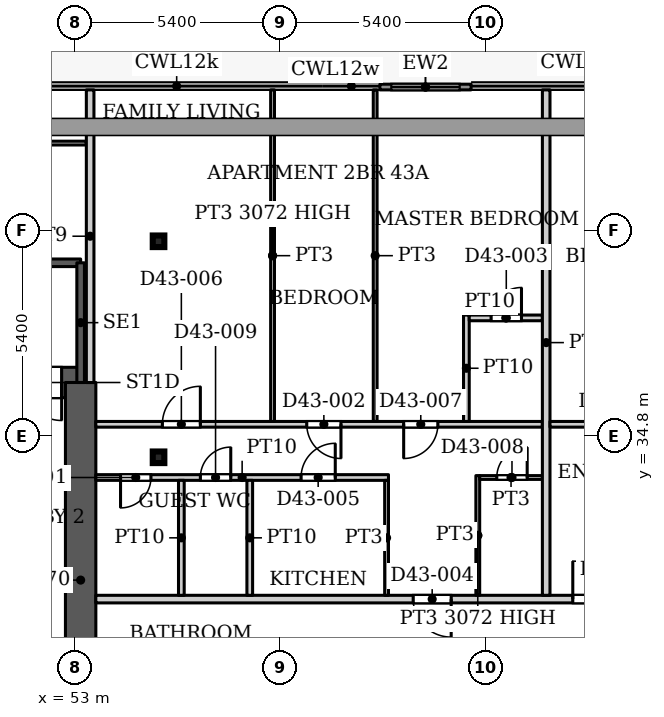
"""IFC4 building model, lengths in metres.
Left out: names, types, materials, properties, quantities, classifications, styles, units other than length and angle.
Written with IfcOpenShell. Run it as: python <this file> out.ifc"""

import sys

from ifc_helpers import new_model, si_unit, direction, frame, frame_2d, origin, origin_2d, place, context, subcontext, project, spatial, rectangle, hollow_rectangle, extrude, source, transform, mapped, element, fill, save


model = new_model("IFC4")
c1 = context("Model", 3, precision=1e-05, world=origin(), true_north=direction((0.0, 1.0)))
c2 = subcontext(c1, "Body", "Model", "MODEL_VIEW")
j1 = project(units=[si_unit("LENGTHUNIT", "METRE"), si_unit("PLANEANGLEUNIT", "RADIAN")], contexts=[c1])
p1 = place(None, origin())
s1 = spatial("IfcSite", under=j1, at=p1, CompositionType="ELEMENT")
p2 = place(p1, origin())
s2 = spatial("IfcBuilding", under=s1, at=p2, CompositionType="ELEMENT")
p3 = place(p2, frame((0.0, 0.0, 183.8)))
s3 = spatial("IfcBuildingStorey", under=s2, at=p3, CompositionType="ELEMENT", Elevation=183.8)
for number, where, z_axis, x_axis in (
    (1, (55.2, 34.232, 0.0), (0.0, 0.0, 1.0), (1.0, 0.0, 0.0)),
    (2, (55.2, 39.916, 0.0), (0.0, 0.0, 1.0), (1.0, 0.0, 0.0)),
):
    element("IfcColumn", number, at=place(p3, frame(where, z_axis=z_axis, x_axis=x_axis)), inside=s3, PredefinedType="COLUMN", context=c2, shape_type="SweptSolid", body=[
        extrude(hollow_rectangle(XDim=0.305, YDim=0.305, WallThickness=0.016, InnerFilletRadius=0.016, OuterFilletRadius=0.032, at=origin_2d()), origin(), (0.0, 0.0, 1.0), 3.9),
    ])
p4 = place(p3, frame((34.75, 36.2, 0.0), z_axis=(0.0, 0.0, 1.0), x_axis=(1.0, 0.0, 0.0)))
e3 = element("IfcWall", 3, at=p4, inside=s3, PredefinedType="SHEAR", context=c2, shape_type="SweptSolid", body=[
    extrude(rectangle(XDim=18.4, YDim=0.8, at=frame_2d((9.2, 0.0))), origin(), (0.0, 0.0, 1.0), 3.9),
])
p5 = place(p4, frame((16.9, 0.0, 0.0)))
e4 = element("IfcOpeningElement", 4, at=p5, cuts=e3, PredefinedType="OPENING", context=c2, shape_type="SweptSolid", body=[
    extrude(rectangle(XDim=1.0, YDim=2.2, at=frame_2d((0.5, 1.1))), frame((0.0, 0.41, 0.0), z_axis=(0.0, -1.0, 0.0), x_axis=(1.0, 0.0, 0.0)), (0.0, 0.0, 1.0), 0.82),
])
p6 = place(p3, frame((53.15, 25.8, 0.0), z_axis=(0.0, 0.0, 1.0), x_axis=(0.0, 1.0, 0.0)))
e5 = element("IfcWall", 5, at=p6, inside=s3, PredefinedType="SHEAR", context=c2, shape_type="SweptSolid", body=[
    extrude(rectangle(XDim=10.4, YDim=0.8, at=frame_2d((5.2, 0.0))), origin(), (0.0, 0.0, 1.0), 3.9),
])
p7 = place(p3, frame((61.024, 43.975, 0.0), z_axis=(0.0, 0.0, 1.0), x_axis=(1.0, 0.0, 0.0)))
e6 = element("IfcWall", 6, at=p7, inside=s3, PredefinedType="SOLIDWALL", context=c2, shape_type="SweptSolid", body=[
    extrude(rectangle(XDim=2.4, YDim=0.15, at=frame_2d((1.2, 0.0))), origin(), (0.0, 0.0, 1.0), 3.75),
])
p8 = place(p7, frame((0.3, 0.0, 0.0)))
e7 = element("IfcOpeningElement", 7, at=p8, cuts=e6, PredefinedType="OPENING", context=c2, shape_type="SweptSolid", body=[
    extrude(rectangle(XDim=1.8, YDim=2.4, at=frame_2d((0.9, 1.2))), frame((0.0, 0.085, 0.0), z_axis=(0.0, -1.0, 0.0), x_axis=(1.0, 0.0, 0.0)), (0.0, 0.0, 1.0), 0.17),
])
p9 = place(p3, frame((43.99, 39.35, 0.0), z_axis=(0.0, 0.0, 1.0), x_axis=(1.0, 0.0, 0.0)))
e8 = element("IfcWall", 8, at=p9, inside=s3, PredefinedType="SHEAR", context=c2, shape_type="SweptSolid", body=[
    extrude(rectangle(XDim=9.16, YDim=0.2, at=frame_2d((4.58, 0.0))), origin(), (0.0, 0.0, 1.0), 3.9),
])
p10 = place(p3, frame((53.15, 36.2, 0.0), z_axis=(0.0, 0.0, 1.0), x_axis=(0.0, 1.0, 0.0)))
e9 = element("IfcWall", 9, at=p10, inside=s3, PredefinedType="SHEAR", context=c2, shape_type="SweptSolid", body=[
    extrude(rectangle(XDim=3.15, YDim=0.2, at=frame_2d((1.575, 0.0))), origin(), (0.0, 0.0, 1.0), 3.9),
])
p11 = place(p3, frame((38.399, 42.5, 0.0), z_axis=(0.0, 0.0, 1.0), x_axis=(1.0, 0.0, 0.0)))
e10 = element("IfcWall", 10, at=p11, inside=s3, PredefinedType="PARTITIONING", context=c2, shape_type="SweptSolid", body=[
    extrude(rectangle(XDim=14.901, YDim=0.1, at=frame_2d((7.451, 0.0))), origin(), (0.0, 0.0, 1.0), 3.6),
])
p12 = place(p11, frame((6.801, 0.0, 0.0)))
e11 = element("IfcOpeningElement", 11, at=p12, cuts=e10, PredefinedType="OPENING", context=c2, shape_type="SweptSolid", body=[
    extrude(rectangle(XDim=1.0, YDim=2.1, at=frame_2d((0.5, 1.05))), frame((0.0, 0.06, 0.0), z_axis=(0.0, -1.0, 0.0), x_axis=(1.0, 0.0, 0.0)), (0.0, 0.0, 1.0), 0.12),
])
p13 = place(p3, frame((53.4, 36.199, 0.0), z_axis=(0.0, 0.0, 1.0), x_axis=(0.0, 1.0, 0.0)))
e12 = element("IfcWall", 12, at=p13, inside=s3, PredefinedType="PARTITIONING", context=c2, shape_type="SweptSolid", body=[
    extrude(rectangle(XDim=7.701, YDim=0.2, at=frame_2d((3.851, 0.0))), origin(), (0.0, 0.0, 1.0), 3.6),
])
p14 = place(p3, frame((53.549, 30.5, 0.0), z_axis=(0.0, 0.0, 1.0), x_axis=(1.0, 0.0, 0.0)))
e13 = element("IfcWall", 13, at=p14, inside=s3, PredefinedType="PARTITIONING", context=c2, shape_type="SweptSolid", body=[
    extrude(rectangle(XDim=44.551, YDim=0.2, at=frame_2d((22.275, 0.0))), origin(), (0.0, 0.0, 1.0), 3.6),
])
p15 = place(p14, frame((8.351, 0.0, 0.0)))
e14 = element("IfcOpeningElement", 14, at=p15, cuts=e13, PredefinedType="OPENING", context=c2, shape_type="SweptSolid", body=[
    extrude(rectangle(XDim=1.0, YDim=2.1, at=frame_2d((0.5, 1.05))), frame((0.0, 0.11, 0.0), z_axis=(0.0, -1.0, 0.0), x_axis=(1.0, 0.0, 0.0)), (0.0, 0.0, 1.0), 0.22),
])
p16 = place(p14, frame((12.551, 0.0, 0.0)))
e15 = element("IfcOpeningElement", 15, at=p16, cuts=e13, PredefinedType="OPENING", context=c2, shape_type="SweptSolid", body=[
    extrude(rectangle(XDim=1.0, YDim=2.1, at=frame_2d((0.5, 1.05))), frame((0.0, 0.11, 0.0), z_axis=(0.0, -1.0, 0.0), x_axis=(1.0, 0.0, 0.0)), (0.0, 0.0, 1.0), 0.22),
])
p17 = place(p14, frame((28.751, 0.0, 0.0)))
e16 = element("IfcOpeningElement", 16, at=p17, cuts=e13, PredefinedType="OPENING", context=c2, shape_type="SweptSolid", body=[
    extrude(rectangle(XDim=1.0, YDim=2.1, at=frame_2d((0.5, 1.05))), frame((0.0, 0.11, 0.0), z_axis=(0.0, -1.0, 0.0), x_axis=(1.0, 0.0, 0.0)), (0.0, 0.0, 1.0), 0.22),
])
p18 = place(p14, frame((40.751, 0.0, 0.0)))
e17 = element("IfcOpeningElement", 17, at=p18, cuts=e13, PredefinedType="OPENING", context=c2, shape_type="SweptSolid", body=[
    extrude(rectangle(XDim=1.0, YDim=2.1, at=frame_2d((0.5, 1.05))), frame((0.0, 0.11, 0.0), z_axis=(0.0, -1.0, 0.0), x_axis=(1.0, 0.0, 0.0)), (0.0, 0.0, 1.0), 0.22),
])
p19 = place(p3, frame((53.549, 33.7, 0.0), z_axis=(0.0, 0.0, 1.0), x_axis=(1.0, 0.0, 0.0)))
e18 = element("IfcWall", 18, at=p19, inside=s3, PredefinedType="PARTITIONING", context=c2, shape_type="SweptSolid", body=[
    extrude(rectangle(XDim=7.701, YDim=0.15, at=frame_2d((3.851, 0.0))), origin(), (0.0, 0.0, 1.0), 3.6),
])
p20 = place(p19, frame((0.651, 0.0, 0.0)))
e19 = element("IfcOpeningElement", 19, at=p20, cuts=e18, PredefinedType="OPENING", context=c2, shape_type="SweptSolid", body=[
    extrude(rectangle(XDim=0.8, YDim=2.1, at=frame_2d((0.4, 1.05))), frame((0.0, 0.085, 0.0), z_axis=(0.0, -1.0, 0.0), x_axis=(1.0, 0.0, 0.0)), (0.0, 0.0, 1.0), 0.17),
])
p21 = place(p19, frame((5.401, 0.0, 0.0)))
e20 = element("IfcOpeningElement", 20, at=p21, cuts=e18, PredefinedType="OPENING", context=c2, shape_type="SweptSolid", body=[
    extrude(rectangle(XDim=0.9, YDim=2.1, at=frame_2d((0.45, 1.05))), frame((0.0, 0.085, 0.0), z_axis=(0.0, -1.0, 0.0), x_axis=(1.0, 0.0, 0.0)), (0.0, 0.0, 1.0), 0.17),
])
p22 = place(p19, frame((2.751, 0.0, 0.0)))
e21 = element("IfcOpeningElement", 21, at=p22, cuts=e18, PredefinedType="OPENING", context=c2, shape_type="SweptSolid", body=[
    extrude(rectangle(XDim=0.8, YDim=2.1, at=frame_2d((0.4, 1.05))), frame((0.0, 0.085, 0.0), z_axis=(0.0, -1.0, 0.0), x_axis=(1.0, 0.0, 0.0)), (0.0, 0.0, 1.0), 0.17),
])
p23 = place(p3, frame((53.549, 35.1, 0.0), z_axis=(0.0, 0.0, 1.0), x_axis=(1.0, 0.0, 0.0)))
e22 = element("IfcWall", 22, at=p23, inside=s3, PredefinedType="PARTITIONING", context=c2, shape_type="SweptSolid", body=[
    extrude(rectangle(XDim=11.751, YDim=0.15, at=frame_2d((5.875, 0.0))), origin(), (0.0, 0.0, 1.0), 3.6),
])
p24 = place(p23, frame((5.551, 0.0, 0.0)))
e23 = element("IfcOpeningElement", 23, at=p24, cuts=e22, PredefinedType="OPENING", context=c2, shape_type="SweptSolid", body=[
    extrude(rectangle(XDim=0.9, YDim=2.1, at=frame_2d((0.45, 1.05))), frame((0.0, 0.085, 0.0), z_axis=(0.0, -1.0, 0.0), x_axis=(1.0, 0.0, 0.0)), (0.0, 0.0, 1.0), 0.17),
])
p25 = place(p23, frame((1.751, 0.0, 0.0)))
e24 = element("IfcOpeningElement", 24, at=p25, cuts=e22, PredefinedType="OPENING", context=c2, shape_type="SweptSolid", body=[
    extrude(rectangle(XDim=1.0, YDim=2.1, at=frame_2d((0.5, 1.05))), frame((0.0, 0.085, 0.0), z_axis=(0.0, -1.0, 0.0), x_axis=(1.0, 0.0, 0.0)), (0.0, 0.0, 1.0), 0.17),
])
p26 = place(p23, frame((8.101, 0.0, 0.0)))
e25 = element("IfcOpeningElement", 25, at=p26, cuts=e22, PredefinedType="OPENING", context=c2, shape_type="SweptSolid", body=[
    extrude(rectangle(XDim=0.9, YDim=2.1, at=frame_2d((0.45, 1.05))), frame((0.0, 0.085, 0.0), z_axis=(0.0, -1.0, 0.0), x_axis=(1.0, 0.0, 0.0)), (0.0, 0.0, 1.0), 0.17),
])
for number, where, z_axis, x_axis in (
    (26, (55.8, 30.6, 0.0), (0.0, 0.0, 1.0), (0.0, 1.0, 0.0)),
    (27, (57.6, 30.6, 0.0), (0.0, 0.0, 1.0), (0.0, 1.0, 0.0)),
):
    element("IfcWall", number, at=place(p3, frame(where, z_axis=z_axis, x_axis=x_axis)), inside=s3, PredefinedType="PARTITIONING", context=c2, shape_type="SweptSolid", body=[
        extrude(rectangle(XDim=3.025, YDim=0.15, at=frame_2d((1.512, 0.0))), origin(), (0.0, 0.0, 1.0), 3.6),
    ])
p27 = place(p3, frame((58.2, 35.175, 0.0), z_axis=(0.0, 0.0, 1.0), x_axis=(0.0, 1.0, 0.0)))
e28 = element("IfcWall", 28, at=p27, inside=s3, PredefinedType="PARTITIONING", context=c2, shape_type="SweptSolid", body=[
    extrude(rectangle(XDim=8.725, YDim=0.1, at=frame_2d((4.362, 0.0))), origin(), (0.0, 0.0, 1.0), 3.072),
])
p28 = place(p3, frame((60.9, 35.175, 0.0), z_axis=(0.0, 0.0, 1.0), x_axis=(0.0, 1.0, 0.0)))
e29 = element("IfcWall", 29, at=p28, inside=s3, PredefinedType="PARTITIONING", context=c2, shape_type="SweptSolid", body=[
    extrude(rectangle(XDim=8.725, YDim=0.1, at=frame_2d((4.362, 0.0))), origin(), (0.0, 0.0, 1.0), 3.6),
])
p29 = place(p3, frame((61.2, 30.6, 0.0), z_axis=(0.0, 0.0, 1.0), x_axis=(0.0, 1.0, 0.0)))
e30 = element("IfcWall", 30, at=p29, inside=s3, PredefinedType="PARTITIONING", context=c2, shape_type="SweptSolid", body=[
    extrude(rectangle(XDim=3.025, YDim=0.1, at=frame_2d((1.512, 0.0))), origin(), (0.0, 0.0, 1.0), 3.6),
])
p30 = place(p3, frame((63.3, 35.175, 0.0), z_axis=(0.0, 0.0, 1.0), x_axis=(0.0, 1.0, 0.0)))
e31 = element("IfcWall", 31, at=p30, inside=s3, PredefinedType="PARTITIONING", context=c2, shape_type="SweptSolid", body=[
    extrude(rectangle(XDim=2.8, YDim=0.15, at=frame_2d((1.4, 0.0))), origin(), (0.0, 0.0, 1.0), 3.6),
])
p31 = place(p3, frame((63.375, 37.9, 0.0), z_axis=(0.0, 0.0, 1.0), x_axis=(1.0, 0.0, 0.0)))
e32 = element("IfcWall", 32, at=p31, inside=s3, PredefinedType="PARTITIONING", context=c2, shape_type="SweptSolid", body=[
    extrude(rectangle(XDim=1.925, YDim=0.15, at=frame_2d((0.962, 0.0))), origin(), (0.0, 0.0, 1.0), 3.6),
])
p32 = place(p31, frame((0.575, 0.0, 0.0)))
e33 = element("IfcOpeningElement", 33, at=p32, cuts=e32, PredefinedType="OPENING", context=c2, shape_type="SweptSolid", body=[
    extrude(rectangle(XDim=0.8, YDim=2.1, at=frame_2d((0.4, 1.05))), frame((0.0, 0.085, 0.0), z_axis=(0.0, -1.0, 0.0), x_axis=(1.0, 0.0, 0.0)), (0.0, 0.0, 1.0), 0.17),
])
p33 = place(p3, frame((63.6, 30.6, 0.0), z_axis=(0.0, 0.0, 1.0), x_axis=(0.0, 1.0, 0.0)))
e34 = element("IfcWall", 34, at=p33, inside=s3, PredefinedType="PARTITIONING", context=c2, shape_type="SweptSolid", body=[
    extrude(rectangle(XDim=3.15, YDim=0.1, at=frame_2d((1.575, 0.0))), origin(), (0.0, 0.0, 1.0), 3.072),
])
p34 = place(p3, frame((63.65, 33.7, 0.0), z_axis=(0.0, 0.0, 1.0), x_axis=(1.0, 0.0, 0.0)))
e35 = element("IfcWall", 35, at=p34, inside=s3, PredefinedType="PARTITIONING", context=c2, shape_type="SweptSolid", body=[
    extrude(rectangle(XDim=1.65, YDim=0.1, at=frame_2d((0.825, 0.0))), origin(), (0.0, 0.0, 1.0), 3.6),
])
p35 = place(p34, frame((0.45, 0.0, 0.0)))
e36 = element("IfcOpeningElement", 36, at=p35, cuts=e35, PredefinedType="OPENING", context=c2, shape_type="SweptSolid", body=[
    extrude(rectangle(XDim=0.8, YDim=2.1, at=frame_2d((0.4, 1.05))), frame((0.0, 0.06, 0.0), z_axis=(0.0, -1.0, 0.0), x_axis=(1.0, 0.0, 0.0)), (0.0, 0.0, 1.0), 0.12),
])
p36 = place(p3, frame((65.4, 30.6, 0.0), z_axis=(0.0, 0.0, 1.0), x_axis=(0.0, 1.0, 0.0)))
e37 = element("IfcWall", 37, at=p36, inside=s3, PredefinedType="PARTITIONING", context=c2, shape_type="SweptSolid", body=[
    extrude(rectangle(XDim=13.3, YDim=0.2, at=frame_2d((6.65, 0.0))), origin(), (0.0, 0.0, 1.0), 3.6),
])
p37 = place(p3, frame((65.5, 35.1, 0.0), z_axis=(0.0, 0.0, 1.0), x_axis=(1.0, 0.0, 0.0)))
e38 = element("IfcWall", 38, at=p37, inside=s3, PredefinedType="PARTITIONING", context=c2, shape_type="SweptSolid", body=[
    extrude(rectangle(XDim=13.3, YDim=0.15, at=frame_2d((6.65, 0.0))), origin(), (0.0, 0.0, 1.0), 3.6),
])
p38 = place(p37, frame((1.4, 0.0, 0.0)))
e39 = element("IfcOpeningElement", 39, at=p38, cuts=e38, PredefinedType="OPENING", context=c2, shape_type="SweptSolid", body=[
    extrude(rectangle(XDim=0.9, YDim=2.1, at=frame_2d((0.45, 1.05))), frame((0.0, 0.085, 0.0), z_axis=(0.0, -1.0, 0.0), x_axis=(1.0, 0.0, 0.0)), (0.0, 0.0, 1.0), 0.17),
])
p39 = place(p37, frame((10.5, 0.0, 0.0)))
e40 = element("IfcOpeningElement", 40, at=p39, cuts=e38, PredefinedType="OPENING", context=c2, shape_type="SweptSolid", body=[
    extrude(rectangle(XDim=1.0, YDim=2.1, at=frame_2d((0.5, 1.05))), frame((0.0, 0.085, 0.0), z_axis=(0.0, -1.0, 0.0), x_axis=(1.0, 0.0, 0.0)), (0.0, 0.0, 1.0), 0.17),
])
p40 = place(p37, frame((6.8, 0.0, 0.0)))
e41 = element("IfcOpeningElement", 41, at=p40, cuts=e38, PredefinedType="OPENING", context=c2, shape_type="SweptSolid", body=[
    extrude(rectangle(XDim=0.9, YDim=2.1, at=frame_2d((0.45, 1.05))), frame((0.0, 0.085, 0.0), z_axis=(0.0, -1.0, 0.0), x_axis=(1.0, 0.0, 0.0)), (0.0, 0.0, 1.0), 0.17),
])
m1 = source(origin(), c2, "Body", "SweptSolid", [
    extrude(rectangle(XDim=1.8, YDim=2.4, at=frame_2d((0.9, 1.2))), frame((0.0, 0.025, 0.0), z_axis=(0.0, -1.0, 0.0), x_axis=(1.0, 0.0, 0.0)), (0.0, 0.0, 1.0), 0.05),
])
p41 = place(p8, origin())
e42 = element("IfcDoor", 42, at=p41, inside=s3, OperationType="SLIDING_TO_LEFT", PredefinedType="DOOR", context=c2, shape_type="MappedRepresentation", body=[
    mapped(m1, transform((0.0, 0.0, 0.0), x_axis=(1.0, 0.0, 0.0), y_axis=(0.0, 1.0, 0.0), z_axis=(0.0, 0.0, 1.0), scale=1.0)),
])
fill(e7, e42)
m2 = source(origin(), c2, "Body", "SweptSolid", [
    extrude(rectangle(XDim=1.0, YDim=2.2, at=frame_2d((0.5, 1.1))), frame((0.0, 0.025, 0.0), z_axis=(0.0, -1.0, 0.0), x_axis=(1.0, 0.0, 0.0)), (0.0, 0.0, 1.0), 0.05),
])
p42 = place(p5, origin())
e43 = element("IfcDoor", 43, at=p42, inside=s3, OperationType="SINGLE_SWING_RIGHT", PredefinedType="DOOR", context=c2, shape_type="MappedRepresentation", body=[
    mapped(m2, transform((0.0, 0.0, 0.0), x_axis=(1.0, 0.0, 0.0), y_axis=(0.0, 1.0, 0.0), z_axis=(0.0, 0.0, 1.0), scale=1.0)),
])
fill(e4, e43)
m3 = source(origin(), c2, "Body", "SweptSolid", [
    extrude(rectangle(XDim=0.8, YDim=2.1, at=frame_2d((0.4, 1.05))), frame((0.0, 0.025, 0.0), z_axis=(0.0, -1.0, 0.0), x_axis=(1.0, 0.0, 0.0)), (0.0, 0.0, 1.0), 0.05),
])
p43 = place(p20, origin())
e44 = element("IfcDoor", 44, at=p43, inside=s3, OperationType="SINGLE_SWING_RIGHT", PredefinedType="DOOR", context=c2, shape_type="MappedRepresentation", body=[
    mapped(m3, transform((0.0, 0.0, 0.0), x_axis=(1.0, 0.0, 0.0), y_axis=(0.0, 1.0, 0.0), z_axis=(0.0, 0.0, 1.0), scale=1.0)),
])
fill(e19, e44)
m4 = source(origin(), c2, "Body", "SweptSolid", [
    extrude(rectangle(XDim=0.9, YDim=2.1, at=frame_2d((0.45, 1.05))), frame((0.0, 0.025, 0.0), z_axis=(0.0, -1.0, 0.0), x_axis=(1.0, 0.0, 0.0)), (0.0, 0.0, 1.0), 0.05),
])
p44 = place(p24, origin())
e45 = element("IfcDoor", 45, at=p44, inside=s3, OperationType="SINGLE_SWING_RIGHT", PredefinedType="DOOR", context=c2, shape_type="MappedRepresentation", body=[
    mapped(m4, transform((0.0, 0.0, 0.0), x_axis=(1.0, 0.0, 0.0), y_axis=(0.0, 1.0, 0.0), z_axis=(0.0, 0.0, 1.0), scale=1.0)),
])
fill(e23, e45)
p45 = place(p32, origin())
e46 = element("IfcDoor", 46, at=p45, inside=s3, OperationType="SINGLE_SWING_LEFT", PredefinedType="DOOR", context=c2, shape_type="MappedRepresentation", body=[
    mapped(m3, transform((0.0, 0.0, 0.0), x_axis=(1.0, 0.0, 0.0), y_axis=(0.0, 1.0, 0.0), z_axis=(0.0, 0.0, 1.0), scale=1.0)),
])
fill(e33, e46)
m5 = source(origin(), c2, "Body", "SweptSolid", [
    extrude(rectangle(XDim=1.0, YDim=2.1, at=frame_2d((0.5, 1.05))), frame((0.0, 0.025, 0.0), z_axis=(0.0, -1.0, 0.0), x_axis=(1.0, 0.0, 0.0)), (0.0, 0.0, 1.0), 0.05),
])
p46 = place(p15, origin())
e47 = element("IfcDoor", 47, at=p46, inside=s3, OperationType="SINGLE_SWING_RIGHT", PredefinedType="DOOR", context=c2, shape_type="MappedRepresentation", body=[
    mapped(m5, transform((0.0, 0.0, 0.0), x_axis=(1.0, 0.0, 0.0), y_axis=(0.0, 1.0, 0.0), z_axis=(0.0, 0.0, 1.0), scale=1.0)),
])
fill(e14, e47)
p47 = place(p21, origin())
e48 = element("IfcDoor", 48, at=p47, inside=s3, OperationType="SINGLE_SWING_LEFT", PredefinedType="DOOR", context=c2, shape_type="MappedRepresentation", body=[
    mapped(m4, transform((0.0, 0.0, 0.0), x_axis=(1.0, 0.0, 0.0), y_axis=(0.0, 1.0, 0.0), z_axis=(0.0, 0.0, 1.0), scale=1.0)),
])
fill(e20, e48)
m6 = source(origin(), c2, "Body", "SweptSolid", [
    extrude(rectangle(XDim=1.0, YDim=2.1, at=frame_2d((0.5, 1.05))), frame((0.0, 0.025, 0.0), z_axis=(0.0, -1.0, 0.0), x_axis=(1.0, 0.0, 0.0)), (0.0, 0.0, 1.0), 0.05),
])
p48 = place(p25, origin())
e49 = element("IfcDoor", 49, at=p48, inside=s3, OperationType="SINGLE_SWING_LEFT", PredefinedType="DOOR", context=c2, shape_type="MappedRepresentation", body=[
    mapped(m6, transform((0.0, 0.0, 0.0), x_axis=(1.0, 0.0, 0.0), y_axis=(0.0, 1.0, 0.0), z_axis=(0.0, 0.0, 1.0), scale=1.0)),
])
fill(e24, e49)
p49 = place(p26, origin())
e50 = element("IfcDoor", 50, at=p49, inside=s3, OperationType="SINGLE_SWING_RIGHT", PredefinedType="DOOR", context=c2, shape_type="MappedRepresentation", body=[
    mapped(m4, transform((0.0, 0.0, 0.0), x_axis=(1.0, 0.0, 0.0), y_axis=(0.0, 1.0, 0.0), z_axis=(0.0, 0.0, 1.0), scale=1.0)),
])
fill(e25, e50)
p50 = place(p35, origin())
e51 = element("IfcDoor", 51, at=p50, inside=s3, OperationType="SINGLE_SWING_LEFT", PredefinedType="DOOR", context=c2, shape_type="MappedRepresentation", body=[
    mapped(m3, transform((0.0, 0.0, 0.0), x_axis=(1.0, 0.0, 0.0), y_axis=(0.0, 1.0, 0.0), z_axis=(0.0, 0.0, 1.0), scale=1.0)),
])
fill(e36, e51)
p51 = place(p22, origin())
e52 = element("IfcDoor", 52, at=p51, inside=s3, OperationType="SINGLE_SWING_LEFT", PredefinedType="DOOR", context=c2, shape_type="MappedRepresentation", body=[
    mapped(m3, transform((0.0, 0.0, 0.0), x_axis=(1.0, 0.0, 0.0), y_axis=(0.0, 1.0, 0.0), z_axis=(0.0, 0.0, 1.0), scale=1.0)),
])
fill(e21, e52)
p52 = place(p16, origin())
e53 = element("IfcDoor", 53, at=p52, inside=s3, OperationType="SINGLE_SWING_LEFT", PredefinedType="DOOR", context=c2, shape_type="MappedRepresentation", body=[
    mapped(m5, transform((0.0, 0.0, 0.0), x_axis=(1.0, 0.0, 0.0), y_axis=(0.0, 1.0, 0.0), z_axis=(0.0, 0.0, 1.0), scale=1.0)),
])
fill(e15, e53)
save(model, sys.argv[1])
